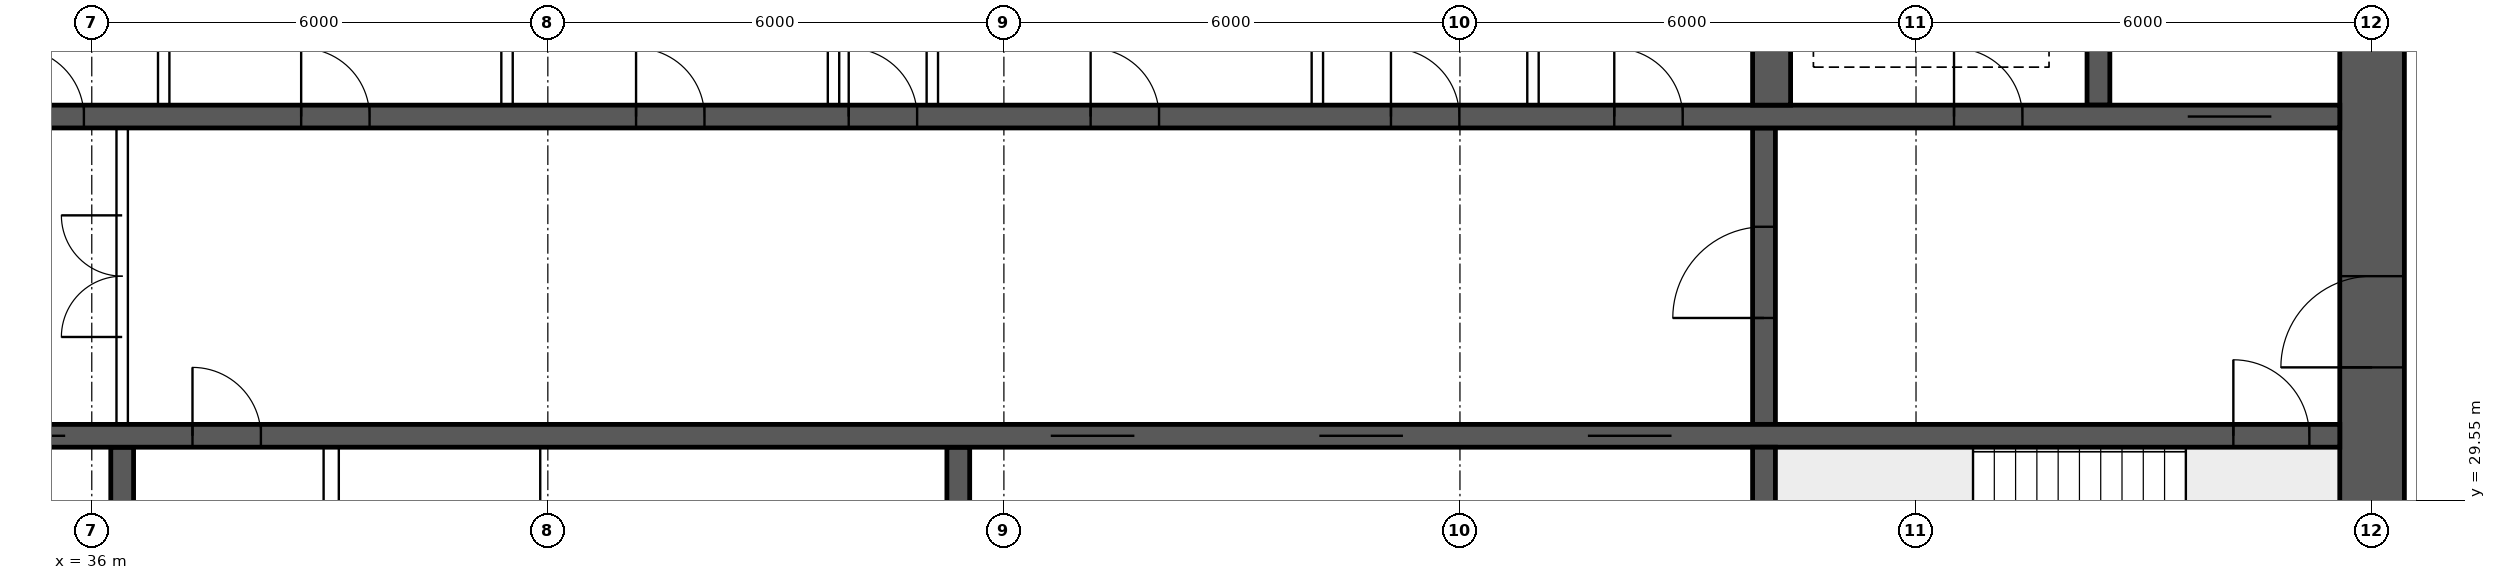
"""IFC4 building model, lengths in metres.
Left out: names, types, materials, properties, quantities, classifications, styles, units other than length and angle.
Written with IfcOpenShell. Run it as: python <this file> out.ifc"""

import sys

from ifc_helpers import new_model, si_unit, direction, frame, frame_2d, origin, place, context, subcontext, project, spatial, rectangle, extrude, element, fill, save


model = new_model("IFC4")
c1 = context("Model", 3, precision=1e-05, world=origin(), true_north=direction((0.0, 1.0)))
c2 = subcontext(c1, "Body", "Model", "MODEL_VIEW")
j1 = project(units=[si_unit("LENGTHUNIT", "METRE"), si_unit("PLANEANGLEUNIT", "RADIAN")], contexts=[c1])
p1 = place(None, origin())
s1 = spatial("IfcSite", under=j1, at=p1, CompositionType="ELEMENT")
p2 = place(p1, origin())
s2 = spatial("IfcBuilding", under=s1, at=p2, CompositionType="ELEMENT")
p3 = place(p2, frame((0.0, 0.0, 144.85)))
s3 = spatial("IfcBuildingStorey", under=s2, at=p3, CompositionType="ELEMENT", Elevation=144.85)
p4 = place(p3, frame((66.0, 26.225, 0.0), z_axis=(0.0, 0.0, 1.0), x_axis=(0.0, 1.0, 0.0)))
e1 = element("IfcWall", 1, at=p4, inside=s3, PredefinedType="SHEAR", context=c2, shape_type="SweptSolid", body=[
    extrude(rectangle(XDim=11.55, YDim=0.85, at=frame_2d((5.775, 0.0))), origin(), (0.0, 0.0, 1.0), 3.75),
])
p5 = place(p4, frame((5.075, 0.0, 0.0)))
e2 = element("IfcOpeningElement", 2, at=p5, cuts=e1, PredefinedType="OPENING", context=c2, shape_type="SweptSolid", body=[
    extrude(rectangle(XDim=1.2, YDim=2.1, at=frame_2d((0.6, 1.05))), frame((0.0, 0.435, 0.0), z_axis=(0.0, -1.0, 0.0), x_axis=(1.0, 0.0, 0.0)), (0.0, 0.0, 1.0), 0.87),
])
p6 = place(p3, frame((18.425, 30.4, 0.0), z_axis=(0.0, 0.0, 1.0), x_axis=(1.0, 0.0, 0.0)))
e3 = element("IfcWall", 3, at=p6, inside=s3, PredefinedType="SHEAR", context=c2, shape_type="SweptSolid", body=[
    extrude(rectangle(XDim=47.15, YDim=0.3, at=frame_2d((23.575, 0.0))), origin(), (0.0, 0.0, 1.0), 3.75),
])
p7 = place(p6, frame((0.4, 0.0, 0.0)))
e4 = element("IfcOpeningElement", 4, at=p7, cuts=e3, PredefinedType="OPENING", context=c2, shape_type="SweptSolid", body=[
    extrude(rectangle(XDim=1.0, YDim=2.1, at=frame_2d((0.5, 1.05))), frame((0.0, 0.16, 0.0), z_axis=(0.0, -1.0, 0.0), x_axis=(1.0, 0.0, 0.0)), (0.0, 0.0, 1.0), 0.32),
])
p8 = place(p6, frame((45.75, 0.0, 0.0)))
e5 = element("IfcOpeningElement", 5, at=p8, cuts=e3, PredefinedType="OPENING", context=c2, shape_type="SweptSolid", body=[
    extrude(rectangle(XDim=1.0, YDim=2.1, at=frame_2d((0.5, 1.05))), frame((0.0, 0.16, 0.0), z_axis=(0.0, -1.0, 0.0), x_axis=(1.0, 0.0, 0.0)), (0.0, 0.0, 1.0), 0.32),
])
p9 = place(p6, frame((8.325, 0.0, 0.0)))
e6 = element("IfcOpeningElement", 6, at=p9, cuts=e3, PredefinedType="OPENING", context=c2, shape_type="SweptSolid", body=[
    extrude(rectangle(XDim=1.1, YDim=2.1, at=frame_2d((0.55, 1.05))), frame((0.0, 0.16, 0.0), z_axis=(0.0, -1.0, 0.0), x_axis=(1.0, 0.0, 0.0)), (0.0, 0.0, 1.0), 0.32),
])
p10 = place(p6, frame((10.925, 0.0, 0.0)))
e7 = element("IfcOpeningElement", 7, at=p10, cuts=e3, PredefinedType="OPENING", context=c2, shape_type="SweptSolid", body=[
    extrude(rectangle(XDim=1.1, YDim=2.1, at=frame_2d((0.55, 1.05))), frame((0.0, 0.16, 0.0), z_axis=(0.0, -1.0, 0.0), x_axis=(1.0, 0.0, 0.0)), (0.0, 0.0, 1.0), 0.32),
])
p11 = place(p6, frame((13.525, 0.0, 0.0)))
e8 = element("IfcOpeningElement", 8, at=p11, cuts=e3, PredefinedType="OPENING", context=c2, shape_type="SweptSolid", body=[
    extrude(rectangle(XDim=1.1, YDim=2.1, at=frame_2d((0.55, 1.05))), frame((0.0, 0.16, 0.0), z_axis=(0.0, -1.0, 0.0), x_axis=(1.0, 0.0, 0.0)), (0.0, 0.0, 1.0), 0.32),
])
p12 = place(p6, frame((16.125, 0.0, 0.0)))
e9 = element("IfcOpeningElement", 9, at=p12, cuts=e3, PredefinedType="OPENING", context=c2, shape_type="SweptSolid", body=[
    extrude(rectangle(XDim=1.1, YDim=2.1, at=frame_2d((0.55, 1.05))), frame((0.0, 0.16, 0.0), z_axis=(0.0, -1.0, 0.0), x_axis=(1.0, 0.0, 0.0)), (0.0, 0.0, 1.0), 0.32),
])
p13 = place(p6, frame((18.9, 0.0, 0.0)))
e10 = element("IfcOpeningElement", 10, at=p13, cuts=e3, PredefinedType="OPENING", context=c2, shape_type="SweptSolid", body=[
    extrude(rectangle(XDim=0.9, YDim=2.1, at=frame_2d((0.45, 1.05))), frame((0.0, 0.16, 0.0), z_axis=(0.0, -1.0, 0.0), x_axis=(1.0, 0.0, 0.0)), (0.0, 0.0, 1.0), 0.32),
])
p14 = place(p6, frame((30.192, 0.0, 0.0)))
e11 = element("IfcOpeningElement", 11, at=p14, cuts=e3, PredefinedType="OPENING", context=c2, shape_type="SweptSolid", body=[
    extrude(rectangle(XDim=1.1, YDim=2.1, at=frame_2d((0.55, 1.05))), frame((0.0, 0.16, 0.0), z_axis=(0.0, -1.0, 0.0), x_axis=(1.0, 0.0, 0.0)), (0.0, 0.0, 1.0), 0.32),
])
p15 = place(p6, frame((33.725, 0.0, 0.0)))
e12 = element("IfcOpeningElement", 12, at=p15, cuts=e3, PredefinedType="OPENING", context=c2, shape_type="SweptSolid", body=[
    extrude(rectangle(XDim=1.1, YDim=2.1, at=frame_2d((0.55, 1.05))), frame((0.0, 0.16, 0.0), z_axis=(0.0, -1.0, 0.0), x_axis=(1.0, 0.0, 0.0)), (0.0, 0.0, 1.0), 0.32),
])
p16 = place(p6, frame((37.258, 0.0, 0.0)))
e13 = element("IfcOpeningElement", 13, at=p16, cuts=e3, PredefinedType="OPENING", context=c2, shape_type="SweptSolid", body=[
    extrude(rectangle(XDim=1.1, YDim=2.1, at=frame_2d((0.55, 1.05))), frame((0.0, 0.16, 0.0), z_axis=(0.0, -1.0, 0.0), x_axis=(1.0, 0.0, 0.0)), (0.0, 0.0, 1.0), 0.32),
])
p17 = place(p3, frame((18.425, 34.6, 0.0), z_axis=(0.0, 0.0, 1.0), x_axis=(1.0, 0.0, 0.0)))
e14 = element("IfcWall", 14, at=p17, inside=s3, PredefinedType="SHEAR", context=c2, shape_type="SweptSolid", body=[
    extrude(rectangle(XDim=47.15, YDim=0.3, at=frame_2d((23.575, 0.0))), origin(), (0.0, 0.0, 1.0), 3.75),
])
p18 = place(p17, frame((0.9, 0.0, 0.0)))
e15 = element("IfcOpeningElement", 15, at=p18, cuts=e14, PredefinedType="OPENING", context=c2, shape_type="SweptSolid", body=[
    extrude(rectangle(XDim=1.1, YDim=2.1, at=frame_2d((0.55, 1.05))), frame((0.0, 0.16, 0.0), z_axis=(0.0, -1.0, 0.0), x_axis=(1.0, 0.0, 0.0)), (0.0, 0.0, 1.0), 0.32),
])
p19 = place(p17, frame((45.15, 0.0, 0.0)))
e16 = element("IfcOpeningElement", 16, at=p19, cuts=e14, PredefinedType="OPENING", context=c2, shape_type="SweptSolid", body=[
    extrude(rectangle(XDim=1.1, YDim=2.1, at=frame_2d((0.55, 1.05))), frame((0.0, 0.16, 0.0), z_axis=(0.0, -1.0, 0.0), x_axis=(1.0, 0.0, 0.0)), (0.0, 0.0, 1.0), 0.32),
])
p20 = place(p17, frame((4.175, 0.0, 0.0)))
e17 = element("IfcOpeningElement", 17, at=p20, cuts=e14, PredefinedType="OPENING", context=c2, shape_type="SweptSolid", body=[
    extrude(rectangle(XDim=0.9, YDim=2.1, at=frame_2d((0.45, 1.05))), frame((0.0, 0.16, 0.0), z_axis=(0.0, -1.0, 0.0), x_axis=(1.0, 0.0, 0.0)), (0.0, 0.0, 1.0), 0.32),
])
p21 = place(p17, frame((42.075, 0.0, 0.0)))
e18 = element("IfcOpeningElement", 18, at=p21, cuts=e14, PredefinedType="OPENING", context=c2, shape_type="SweptSolid", body=[
    extrude(rectangle(XDim=0.9, YDim=2.1, at=frame_2d((0.45, 1.05))), frame((0.0, 0.16, 0.0), z_axis=(0.0, -1.0, 0.0), x_axis=(1.0, 0.0, 0.0)), (0.0, 0.0, 1.0), 0.32),
])
p22 = place(p17, frame((8.95, 0.0, 0.0)))
e19 = element("IfcOpeningElement", 19, at=p22, cuts=e14, PredefinedType="OPENING", context=c2, shape_type="SweptSolid", body=[
    extrude(rectangle(XDim=0.9, YDim=2.1, at=frame_2d((0.45, 1.05))), frame((0.0, 0.16, 0.0), z_axis=(0.0, -1.0, 0.0), x_axis=(1.0, 0.0, 0.0)), (0.0, 0.0, 1.0), 0.32),
])
p23 = place(p17, frame((12.924, 0.0, 0.0)))
e20 = element("IfcOpeningElement", 20, at=p23, cuts=e14, PredefinedType="OPENING", context=c2, shape_type="SweptSolid", body=[
    extrude(rectangle(XDim=0.9, YDim=2.1, at=frame_2d((0.45, 1.05))), frame((0.0, 0.16, 0.0), z_axis=(0.0, -1.0, 0.0), x_axis=(1.0, 0.0, 0.0)), (0.0, 0.0, 1.0), 0.32),
])
p24 = place(p17, frame((16.571, 0.0, 0.0)))
e21 = element("IfcOpeningElement", 21, at=p24, cuts=e14, PredefinedType="OPENING", context=c2, shape_type="SweptSolid", body=[
    extrude(rectangle(XDim=0.9, YDim=2.1, at=frame_2d((0.45, 1.05))), frame((0.0, 0.16, 0.0), z_axis=(0.0, -1.0, 0.0), x_axis=(1.0, 0.0, 0.0)), (0.0, 0.0, 1.0), 0.32),
])
p25 = place(p17, frame((20.33, 0.0, 0.0)))
e22 = element("IfcOpeningElement", 22, at=p25, cuts=e14, PredefinedType="OPENING", context=c2, shape_type="SweptSolid", body=[
    extrude(rectangle(XDim=0.9, YDim=2.1, at=frame_2d((0.45, 1.05))), frame((0.0, 0.16, 0.0), z_axis=(0.0, -1.0, 0.0), x_axis=(1.0, 0.0, 0.0)), (0.0, 0.0, 1.0), 0.32),
])
p26 = place(p17, frame((24.736, 0.0, 0.0)))
e23 = element("IfcOpeningElement", 23, at=p26, cuts=e14, PredefinedType="OPENING", context=c2, shape_type="SweptSolid", body=[
    extrude(rectangle(XDim=0.9, YDim=2.1, at=frame_2d((0.45, 1.05))), frame((0.0, 0.16, 0.0), z_axis=(0.0, -1.0, 0.0), x_axis=(1.0, 0.0, 0.0)), (0.0, 0.0, 1.0), 0.32),
])
p27 = place(p17, frame((27.533, 0.0, 0.0)))
e24 = element("IfcOpeningElement", 24, at=p27, cuts=e14, PredefinedType="OPENING", context=c2, shape_type="SweptSolid", body=[
    extrude(rectangle(XDim=0.9, YDim=2.1, at=frame_2d((0.45, 1.05))), frame((0.0, 0.16, 0.0), z_axis=(0.0, -1.0, 0.0), x_axis=(1.0, 0.0, 0.0)), (0.0, 0.0, 1.0), 0.32),
])
p28 = place(p17, frame((30.716, 0.0, 0.0)))
e25 = element("IfcOpeningElement", 25, at=p28, cuts=e14, PredefinedType="OPENING", context=c2, shape_type="SweptSolid", body=[
    extrude(rectangle(XDim=0.9, YDim=2.1, at=frame_2d((0.45, 1.05))), frame((0.0, 0.16, 0.0), z_axis=(0.0, -1.0, 0.0), x_axis=(1.0, 0.0, 0.0)), (0.0, 0.0, 1.0), 0.32),
])
p29 = place(p17, frame((34.667, 0.0, 0.0)))
e26 = element("IfcOpeningElement", 26, at=p29, cuts=e14, PredefinedType="OPENING", context=c2, shape_type="SweptSolid", body=[
    extrude(rectangle(XDim=0.9, YDim=2.1, at=frame_2d((0.45, 1.05))), frame((0.0, 0.16, 0.0), z_axis=(0.0, -1.0, 0.0), x_axis=(1.0, 0.0, 0.0)), (0.0, 0.0, 1.0), 0.32),
])
p30 = place(p17, frame((37.605, 0.0, 0.0)))
e27 = element("IfcOpeningElement", 27, at=p30, cuts=e14, PredefinedType="OPENING", context=c2, shape_type="SweptSolid", body=[
    extrude(rectangle(XDim=0.9, YDim=2.1, at=frame_2d((0.45, 1.05))), frame((0.0, 0.16, 0.0), z_axis=(0.0, -1.0, 0.0), x_axis=(1.0, 0.0, 0.0)), (0.0, 0.0, 1.0), 0.32),
])
p31 = place(p3, frame((58.0, 26.225, 0.0), z_axis=(0.0, 0.0, 1.0), x_axis=(0.0, 1.0, 0.0)))
e28 = element("IfcWall", 28, at=p31, inside=s3, PredefinedType="SHEAR", context=c2, shape_type="SweptSolid", body=[
    extrude(rectangle(XDim=4.025, YDim=0.3, at=frame_2d((2.012, 0.0))), origin(), (0.0, 0.0, 1.0), 3.75),
])
p32 = place(p3, frame((58.0, 30.55, 0.0), z_axis=(0.0, 0.0, 1.0), x_axis=(0.0, 1.0, 0.0)))
e29 = element("IfcWall", 29, at=p32, inside=s3, PredefinedType="SHEAR", context=c2, shape_type="SweptSolid", body=[
    extrude(rectangle(XDim=3.9, YDim=0.3, at=frame_2d((1.95, 0.0))), origin(), (0.0, 0.0, 1.0), 3.75),
])
p33 = place(p32, frame((1.4, 0.0, 0.0)))
e30 = element("IfcOpeningElement", 30, at=p33, cuts=e29, PredefinedType="OPENING", context=c2, shape_type="SweptSolid", body=[
    extrude(rectangle(XDim=1.2, YDim=2.1, at=frame_2d((0.6, 1.05))), frame((0.0, 0.16, 0.0), z_axis=(0.0, -1.0, 0.0), x_axis=(1.0, 0.0, 0.0)), (0.0, 0.0, 1.0), 0.32),
])
p34 = place(p3, frame((62.4, 34.75, 0.0), z_axis=(0.0, 0.0, 1.0), x_axis=(0.0, 1.0, 0.0)))
e31 = element("IfcWall", 31, at=p34, inside=s3, PredefinedType="SHEAR", context=c2, shape_type="SweptSolid", body=[
    extrude(rectangle(XDim=3.025, YDim=0.3, at=frame_2d((1.512, 0.0))), origin(), (0.0, 0.0, 1.0), 3.75),
])
p35 = place(p3, frame((58.1, 34.75, 0.0), z_axis=(0.0, 0.0, 1.0), x_axis=(0.0, 1.0, 0.0)))
e32 = element("IfcWall", 32, at=p35, inside=s3, PredefinedType="SHEAR", context=c2, shape_type="SweptSolid", body=[
    extrude(rectangle(XDim=3.025, YDim=0.5, at=frame_2d((1.512, 0.0))), origin(), (0.0, 0.0, 1.0), 3.75),
])
for number, where, z_axis, x_axis in (
    (33, (36.4, 26.225, 0.0), (0.0, 0.0, 1.0), (0.0, 1.0, 0.0)),
    (34, (47.4, 26.225, 0.0), (0.0, 0.0, 1.0), (0.0, 1.0, 0.0)),
):
    element("IfcWall", number, at=place(p3, frame(where, z_axis=z_axis, x_axis=x_axis)), inside=s3, PredefinedType="SHEAR", context=c2, shape_type="SweptSolid", body=[
        extrude(rectangle(XDim=4.025, YDim=0.3, at=frame_2d((2.012, 0.0))), origin(), (0.0, 0.0, 1.0), 3.75),
    ])
p36 = place(p3, frame((36.4, 30.55, 0.0), z_axis=(0.0, 0.0, 1.0), x_axis=(0.0, 1.0, 0.0)))
e35 = element("IfcWall", 35, at=p36, inside=s3, PredefinedType="SOLIDWALL", context=c2, shape_type="SweptSolid", body=[
    extrude(rectangle(XDim=3.9, YDim=0.15, at=frame_2d((1.95, 0.0))), origin(), (0.0, 0.0, 1.0), 3.3),
])
p37 = place(p36, frame((1.15, 0.0, 0.0)))
e36 = element("IfcOpeningElement", 36, at=p37, cuts=e35, PredefinedType="OPENING", context=c2, shape_type="SweptSolid", body=[
    extrude(rectangle(XDim=1.6, YDim=2.1, at=frame_2d((0.8, 1.05))), frame((0.0, 0.085, 0.0), z_axis=(0.0, -1.0, 0.0), x_axis=(1.0, 0.0, 0.0)), (0.0, 0.0, 1.0), 0.17),
])
for number, where, z_axis, x_axis in (
    (37, (36.946, 34.75, 0.0), (0.0, 0.0, 1.0), (0.0, 1.0, 0.0)),
    (38, (41.463, 34.75, 0.0), (0.0, 0.0, 1.0), (0.0, 1.0, 0.0)),
    (39, (45.758, 34.75, 0.0), (0.0, 0.0, 1.0), (0.0, 1.0, 0.0)),
    (40, (47.058, 34.75, 0.0), (0.0, 0.0, 1.0), (0.0, 1.0, 0.0)),
    (41, (52.124, 34.75, 0.0), (0.0, 0.0, 1.0), (0.0, 1.0, 0.0)),
    (42, (54.961, 34.75, 0.0), (0.0, 0.0, 1.0), (0.0, 1.0, 0.0)),
):
    element("IfcWall", number, at=place(p3, frame(where, z_axis=z_axis, x_axis=x_axis)), inside=s3, PredefinedType="SOLIDWALL", context=c2, shape_type="SweptSolid", body=[
        extrude(rectangle(XDim=3.025, YDim=0.15, at=frame_2d((1.512, 0.0))), origin(), (0.0, 0.0, 1.0), 3.3),
    ])
p38 = place(p3, frame((39.15, 26.225, 0.0), z_axis=(0.0, 0.0, 1.0), x_axis=(0.0, 1.0, 0.0)))
e43 = element("IfcWall", 43, at=p38, inside=s3, PredefinedType="SOLIDWALL", context=c2, shape_type="SweptSolid", body=[
    extrude(rectangle(XDim=4.025, YDim=0.2, at=frame_2d((2.012, 0.0))), origin(), (0.0, 0.0, 1.0), 3.3),
])
p39 = place(p37, origin())
e44 = element("IfcDoor", 44, at=p39, inside=s3, OperationType="DOUBLE_DOOR_SINGLE_SWING", PredefinedType="DOOR", context=c2, shape_type="SweptSolid", body=[
    extrude(rectangle(XDim=1.6, YDim=2.1, at=frame_2d((0.8, 1.05))), frame((0.0, 0.025, 0.0), z_axis=(0.0, -1.0, 0.0), x_axis=(1.0, 0.0, 0.0)), (0.0, 0.0, 1.0), 0.05),
])
fill(e36, e44)
p40 = place(p5, origin())
e45 = element("IfcDoor", 45, at=p40, inside=s3, OperationType="SINGLE_SWING_LEFT", PredefinedType="DOOR", context=c2, shape_type="SweptSolid", body=[
    extrude(rectangle(XDim=1.2, YDim=2.1, at=frame_2d((0.6, 1.05))), frame((0.0, 0.025, 0.0), z_axis=(0.0, -1.0, 0.0), x_axis=(1.0, 0.0, 0.0)), (0.0, 0.0, 1.0), 0.05),
])
fill(e2, e45)
p41 = place(p8, origin())
e46 = element("IfcDoor", 46, at=p41, inside=s3, OperationType="SINGLE_SWING_LEFT", PredefinedType="DOOR", context=c2, shape_type="SweptSolid", body=[
    extrude(rectangle(XDim=1.0, YDim=2.1, at=frame_2d((0.5, 1.05))), frame((0.0, 0.025, 0.0), z_axis=(0.0, -1.0, 0.0), x_axis=(1.0, 0.0, 0.0)), (0.0, 0.0, 1.0), 0.05),
])
fill(e5, e46)
p42 = place(p19, origin())
e47 = element("IfcDoor", 47, at=p42, inside=s3, OperationType="DOUBLE_DOOR_SLIDING", PredefinedType="DOOR", context=c2, shape_type="SweptSolid", body=[
    extrude(rectangle(XDim=1.1, YDim=2.1, at=frame_2d((0.55, 1.05))), frame((0.0, 0.025, 0.0), z_axis=(0.0, -1.0, 0.0), x_axis=(1.0, 0.0, 0.0)), (0.0, 0.0, 1.0), 0.05),
])
fill(e16, e47)
p43 = place(p21, origin())
e48 = element("IfcDoor", 48, at=p43, inside=s3, OperationType="SINGLE_SWING_LEFT", PredefinedType="DOOR", context=c2, shape_type="SweptSolid", body=[
    extrude(rectangle(XDim=0.9, YDim=2.1, at=frame_2d((0.45, 1.05))), frame((0.0, 0.025, 0.0), z_axis=(0.0, -1.0, 0.0), x_axis=(1.0, 0.0, 0.0)), (0.0, 0.0, 1.0), 0.05),
])
fill(e18, e48)
p44 = place(p33, origin())
e49 = element("IfcDoor", 49, at=p44, inside=s3, OperationType="SINGLE_SWING_LEFT", PredefinedType="DOOR", context=c2, shape_type="SweptSolid", body=[
    extrude(rectangle(XDim=1.2, YDim=2.1, at=frame_2d((0.6, 1.05))), frame((0.0, 0.025, 0.0), z_axis=(0.0, -1.0, 0.0), x_axis=(1.0, 0.0, 0.0)), (0.0, 0.0, 1.0), 0.05),
])
fill(e30, e49)
p45 = place(p24, origin())
e50 = element("IfcDoor", 50, at=p45, inside=s3, OperationType="SINGLE_SWING_LEFT", PredefinedType="DOOR", context=c2, shape_type="SweptSolid", body=[
    extrude(rectangle(XDim=0.9, YDim=2.1, at=frame_2d((0.45, 1.05))), frame((0.0, 0.025, 0.0), z_axis=(0.0, -1.0, 0.0), x_axis=(1.0, 0.0, 0.0)), (0.0, 0.0, 1.0), 0.05),
])
fill(e21, e50)
p46 = place(p25, origin())
e51 = element("IfcDoor", 51, at=p46, inside=s3, OperationType="SINGLE_SWING_LEFT", PredefinedType="DOOR", context=c2, shape_type="SweptSolid", body=[
    extrude(rectangle(XDim=0.9, YDim=2.1, at=frame_2d((0.45, 1.05))), frame((0.0, 0.025, 0.0), z_axis=(0.0, -1.0, 0.0), x_axis=(1.0, 0.0, 0.0)), (0.0, 0.0, 1.0), 0.05),
])
fill(e22, e51)
p47 = place(p26, origin())
e52 = element("IfcDoor", 52, at=p47, inside=s3, OperationType="SINGLE_SWING_LEFT", PredefinedType="DOOR", context=c2, shape_type="SweptSolid", body=[
    extrude(rectangle(XDim=0.9, YDim=2.1, at=frame_2d((0.45, 1.05))), frame((0.0, 0.025, 0.0), z_axis=(0.0, -1.0, 0.0), x_axis=(1.0, 0.0, 0.0)), (0.0, 0.0, 1.0), 0.05),
])
fill(e23, e52)
p48 = place(p27, origin())
e53 = element("IfcDoor", 53, at=p48, inside=s3, OperationType="SINGLE_SWING_LEFT", PredefinedType="DOOR", context=c2, shape_type="SweptSolid", body=[
    extrude(rectangle(XDim=0.9, YDim=2.1, at=frame_2d((0.45, 1.05))), frame((0.0, 0.025, 0.0), z_axis=(0.0, -1.0, 0.0), x_axis=(1.0, 0.0, 0.0)), (0.0, 0.0, 1.0), 0.05),
])
fill(e24, e53)
p49 = place(p28, origin())
e54 = element("IfcDoor", 54, at=p49, inside=s3, OperationType="SINGLE_SWING_LEFT", PredefinedType="DOOR", context=c2, shape_type="SweptSolid", body=[
    extrude(rectangle(XDim=0.9, YDim=2.1, at=frame_2d((0.45, 1.05))), frame((0.0, 0.025, 0.0), z_axis=(0.0, -1.0, 0.0), x_axis=(1.0, 0.0, 0.0)), (0.0, 0.0, 1.0), 0.05),
])
fill(e25, e54)
p50 = place(p29, origin())
e55 = element("IfcDoor", 55, at=p50, inside=s3, OperationType="SINGLE_SWING_LEFT", PredefinedType="DOOR", context=c2, shape_type="SweptSolid", body=[
    extrude(rectangle(XDim=0.9, YDim=2.1, at=frame_2d((0.45, 1.05))), frame((0.0, 0.025, 0.0), z_axis=(0.0, -1.0, 0.0), x_axis=(1.0, 0.0, 0.0)), (0.0, 0.0, 1.0), 0.05),
])
fill(e26, e55)
p51 = place(p30, origin())
e56 = element("IfcDoor", 56, at=p51, inside=s3, OperationType="SINGLE_SWING_LEFT", PredefinedType="DOOR", context=c2, shape_type="SweptSolid", body=[
    extrude(rectangle(XDim=0.9, YDim=2.1, at=frame_2d((0.45, 1.05))), frame((0.0, 0.025, 0.0), z_axis=(0.0, -1.0, 0.0), x_axis=(1.0, 0.0, 0.0)), (0.0, 0.0, 1.0), 0.05),
])
fill(e27, e56)
p52 = place(p12, origin())
e57 = element("IfcDoor", 57, at=p52, inside=s3, OperationType="DOUBLE_DOOR_SLIDING", PredefinedType="DOOR", context=c2, shape_type="SweptSolid", body=[
    extrude(rectangle(XDim=1.1, YDim=2.1, at=frame_2d((0.55, 1.05))), frame((0.0, 0.025, 0.0), z_axis=(0.0, -1.0, 0.0), x_axis=(1.0, 0.0, 0.0)), (0.0, 0.0, 1.0), 0.05),
])
fill(e9, e57)
p53 = place(p13, origin())
e58 = element("IfcDoor", 58, at=p53, inside=s3, OperationType="SINGLE_SWING_LEFT", PredefinedType="DOOR", context=c2, shape_type="SweptSolid", body=[
    extrude(rectangle(XDim=0.9, YDim=2.1, at=frame_2d((0.45, 1.05))), frame((0.0, 0.025, 0.0), z_axis=(0.0, -1.0, 0.0), x_axis=(1.0, 0.0, 0.0)), (0.0, 0.0, 1.0), 0.05),
])
fill(e10, e58)
p54 = place(p14, origin())
e59 = element("IfcDoor", 59, at=p54, inside=s3, OperationType="DOUBLE_DOOR_SLIDING", PredefinedType="DOOR", context=c2, shape_type="SweptSolid", body=[
    extrude(rectangle(XDim=1.1, YDim=2.1, at=frame_2d((0.55, 1.05))), frame((0.0, 0.025, 0.0), z_axis=(0.0, -1.0, 0.0), x_axis=(1.0, 0.0, 0.0)), (0.0, 0.0, 1.0), 0.05),
])
fill(e11, e59)
p55 = place(p15, origin())
e60 = element("IfcDoor", 60, at=p55, inside=s3, OperationType="DOUBLE_DOOR_SLIDING", PredefinedType="DOOR", context=c2, shape_type="SweptSolid", body=[
    extrude(rectangle(XDim=1.1, YDim=2.1, at=frame_2d((0.55, 1.05))), frame((0.0, 0.025, 0.0), z_axis=(0.0, -1.0, 0.0), x_axis=(1.0, 0.0, 0.0)), (0.0, 0.0, 1.0), 0.05),
])
fill(e12, e60)
p56 = place(p16, origin())
e61 = element("IfcDoor", 61, at=p56, inside=s3, OperationType="DOUBLE_DOOR_SLIDING", PredefinedType="DOOR", context=c2, shape_type="SweptSolid", body=[
    extrude(rectangle(XDim=1.1, YDim=2.1, at=frame_2d((0.55, 1.05))), frame((0.0, 0.025, 0.0), z_axis=(0.0, -1.0, 0.0), x_axis=(1.0, 0.0, 0.0)), (0.0, 0.0, 1.0), 0.05),
])
fill(e13, e61)
save(model, sys.argv[1])
